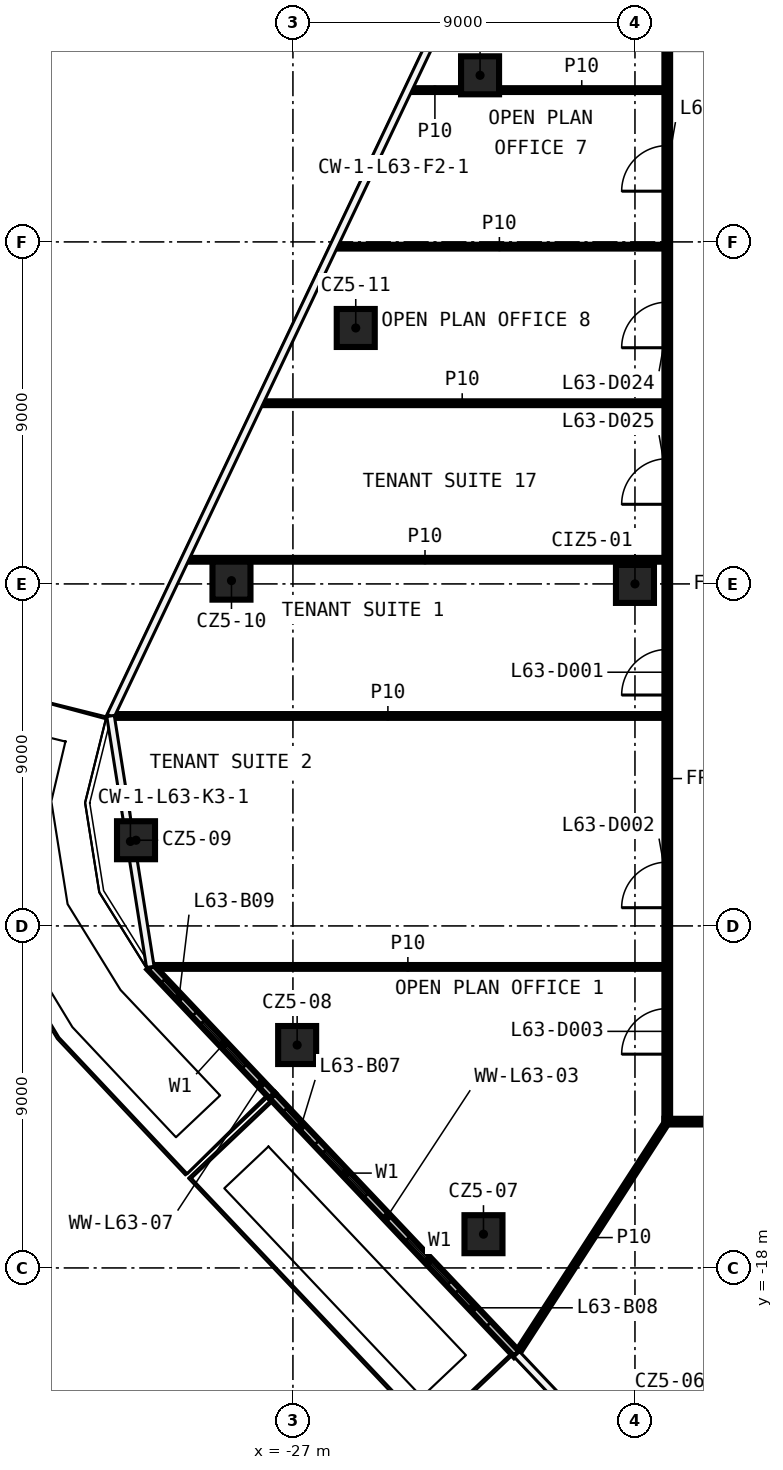
"""IFC4 building model, lengths in metres.
Left out: names, types, materials, properties, quantities, classifications, styles, units other than length and angle.
Written with IfcOpenShell. Run it as: python <this file> out.ifc"""

import sys

from ifc_helpers import new_model, si_unit, direction, frame, frame_2d, origin, origin_2d, place, context, subcontext, project, spatial, rectangle, extrude, element, fill, save


model = new_model("IFC4")
c1 = context("Model", 3, precision=1e-05, world=origin(), true_north=direction((0.0, 1.0)))
c2 = subcontext(c1, "Body", "Model", "MODEL_VIEW")
j1 = project(units=[si_unit("LENGTHUNIT", "METRE"), si_unit("PLANEANGLEUNIT", "RADIAN")], contexts=[c1])
p1 = place(None, origin())
s1 = spatial("IfcSite", under=j1, at=p1, CompositionType="ELEMENT")
p2 = place(p1, origin())
s2 = spatial("IfcBuilding", under=s1, at=p2, CompositionType="ELEMENT")
p3 = place(p2, frame((0.0, 0.0, 298.4)))
s3 = spatial("IfcBuildingStorey", under=s2, at=p3, CompositionType="ELEMENT", Elevation=298.4)
for number, where, z_axis, x_axis in (
    (1, (-21.986, -17.112, 0.0), (0.0, 0.0, 1.0), (1.0, 0.0, 0.0)),
    (2, (-26.889, -12.134, 0.0), (0.0, 0.0, 1.0), (1.0, 0.0, 0.0)),
    (3, (-31.129, -6.745, 0.0), (0.0, 0.0, 1.0), (1.0, 0.0, 0.0)),
    (4, (-28.617, 0.086, 0.0), (0.0, 0.0, 1.0), (1.0, 0.0, 0.0)),
    (5, (-25.347, 6.735, 0.0), (0.0, 0.0, 1.0), (1.0, 0.0, 0.0)),
    (6, (-22.076, 13.384, 0.0), (0.0, 0.0, 1.0), (1.0, 0.0, 0.0)),
    (7, (-18.0, 0.0, 0.0), (0.0, 0.0, 1.0), (1.0, 0.0, 0.0)),
):
    element("IfcColumn", number, at=place(p3, frame(where, z_axis=z_axis, x_axis=x_axis)), inside=s3, PredefinedType="COLUMN", context=c2, shape_type="SweptSolid", body=[
        extrude(rectangle(XDim=1.0, YDim=1.0, at=origin_2d()), origin(), (0.0, 0.0, 1.0), 3.82),
    ])
p4 = place(p3, frame((17.225, -14.15, 0.0), z_axis=(0.0, 0.0, 1.0), x_axis=(-1.0, 0.0, 0.0)))
e8 = element("IfcWall", 8, at=p4, inside=s3, PredefinedType="PARTITIONING", context=c2, shape_type="SweptSolid", body=[
    extrude(rectangle(XDim=34.45, YDim=0.15, at=frame_2d((17.225, 0.0))), origin(), (0.0, 0.0, 1.0), 3.82),
])
p5 = place(p4, frame((31.54, 0.0, 0.0)))
e9 = element("IfcOpeningElement", 9, at=p5, cuts=e8, PredefinedType="OPENING", context=c2, shape_type="SweptSolid", body=[
    extrude(rectangle(XDim=1.2, YDim=2.1, at=frame_2d((0.6, 1.05))), frame((0.0, 0.085, 0.0), z_axis=(0.0, -1.0, 0.0), x_axis=(1.0, 0.0, 0.0)), (0.0, 0.0, 1.0), 0.17),
])
p6 = place(p4, frame((25.804, 0.0, 0.0)))
e10 = element("IfcOpeningElement", 10, at=p6, cuts=e8, PredefinedType="OPENING", context=c2, shape_type="SweptSolid", body=[
    extrude(rectangle(XDim=1.2, YDim=2.1, at=frame_2d((0.6, 1.05))), frame((0.0, 0.085, 0.0), z_axis=(0.0, -1.0, 0.0), x_axis=(1.0, 0.0, 0.0)), (0.0, 0.0, 1.0), 0.17),
])
p7 = place(p4, frame((17.681, 0.0, 0.0)))
e11 = element("IfcOpeningElement", 11, at=p7, cuts=e8, PredefinedType="OPENING", context=c2, shape_type="SweptSolid", body=[
    extrude(rectangle(XDim=1.2, YDim=2.1, at=frame_2d((0.6, 1.05))), frame((0.0, 0.085, 0.0), z_axis=(0.0, -1.0, 0.0), x_axis=(1.0, 0.0, 0.0)), (0.0, 0.0, 1.0), 0.17),
])
p8 = place(p4, frame((10.752, 0.0, 0.0)))
e12 = element("IfcOpeningElement", 12, at=p8, cuts=e8, PredefinedType="OPENING", context=c2, shape_type="SweptSolid", body=[
    extrude(rectangle(XDim=1.2, YDim=2.1, at=frame_2d((0.6, 1.05))), frame((0.0, 0.085, 0.0), z_axis=(0.0, -1.0, 0.0), x_axis=(1.0, 0.0, 0.0)), (0.0, 0.0, 1.0), 0.17),
])
p9 = place(p4, frame((6.133, 0.0, 0.0)))
e13 = element("IfcOpeningElement", 13, at=p9, cuts=e8, PredefinedType="OPENING", context=c2, shape_type="SweptSolid", body=[
    extrude(rectangle(XDim=1.2, YDim=2.1, at=frame_2d((0.6, 1.05))), frame((0.0, 0.085, 0.0), z_axis=(0.0, -1.0, 0.0), x_axis=(1.0, 0.0, 0.0)), (0.0, 0.0, 1.0), 0.17),
])
p10 = place(p4, frame((1.851, 0.0, 0.0)))
e14 = element("IfcOpeningElement", 14, at=p10, cuts=e8, PredefinedType="OPENING", context=c2, shape_type="SweptSolid", body=[
    extrude(rectangle(XDim=1.2, YDim=2.1, at=frame_2d((0.6, 1.05))), frame((0.0, 0.085, 0.0), z_axis=(0.0, -1.0, 0.0), x_axis=(1.0, 0.0, 0.0)), (0.0, 0.0, 1.0), 0.17),
])
p11 = place(p3, frame((-30.726, -10.079, 0.0), z_axis=(0.0, 0.0, 1.0), x_axis=(1.0, 0.0, 0.0)))
e15 = element("IfcWall", 15, at=p11, inside=s3, PredefinedType="PARTITIONING", context=c2, shape_type="SweptSolid", body=[
    extrude(rectangle(XDim=13.5, YDim=0.1, at=frame_2d((6.75, 0.0))), origin(), (0.0, 0.0, 1.0), 3.82),
])
p12 = place(p3, frame((-31.777, -3.475, 0.0), z_axis=(0.0, 0.0, 1.0), x_axis=(1.0, 0.0, 0.0)))
e16 = element("IfcWall", 16, at=p12, inside=s3, PredefinedType="PARTITIONING", context=c2, shape_type="SweptSolid", body=[
    extrude(rectangle(XDim=14.552, YDim=0.1, at=frame_2d((7.276, 0.0))), origin(), (0.0, 0.0, 1.0), 3.82),
])
p13 = place(p3, frame((-29.824, 0.635, 0.0), z_axis=(0.0, 0.0, 1.0), x_axis=(1.0, 0.0, 0.0)))
e17 = element("IfcWall", 17, at=p13, inside=s3, PredefinedType="PARTITIONING", context=c2, shape_type="SweptSolid", body=[
    extrude(rectangle(XDim=12.599, YDim=0.1, at=frame_2d((6.3, 0.0))), origin(), (0.0, 0.0, 1.0), 3.82),
])
p14 = place(p3, frame((-27.867, 4.755, 0.0), z_axis=(0.0, 0.0, 1.0), x_axis=(1.0, 0.0, 0.0)))
e18 = element("IfcWall", 18, at=p14, inside=s3, PredefinedType="PARTITIONING", context=c2, shape_type="SweptSolid", body=[
    extrude(rectangle(XDim=10.642, YDim=0.1, at=frame_2d((5.321, 0.0))), origin(), (0.0, 0.0, 1.0), 3.82),
])
p15 = place(p3, frame((-25.909, 8.875, 0.0), z_axis=(0.0, 0.0, 1.0), x_axis=(1.0, 0.0, 0.0)))
e19 = element("IfcWall", 19, at=p15, inside=s3, PredefinedType="PARTITIONING", context=c2, shape_type="SweptSolid", body=[
    extrude(rectangle(XDim=8.684, YDim=0.1, at=frame_2d((4.342, 0.0))), origin(), (0.0, 0.0, 1.0), 3.82),
])
p16 = place(p3, frame((-23.952, 12.995, 0.0), z_axis=(0.0, 0.0, 1.0), x_axis=(1.0, 0.0, 0.0)))
e20 = element("IfcWall", 20, at=p16, inside=s3, PredefinedType="PARTITIONING", context=c2, shape_type="SweptSolid", body=[
    extrude(rectangle(XDim=1.376, YDim=0.1, at=frame_2d((0.688, 0.0))), origin(), (0.0, 0.0, 1.0), 3.82),
])
p17 = place(p3, frame((-21.576, 12.995, 0.0), z_axis=(0.0, 0.0, 1.0), x_axis=(1.0, 0.0, 0.0)))
e21 = element("IfcWall", 21, at=p17, inside=s3, PredefinedType="PARTITIONING", context=c2, shape_type="SweptSolid", body=[
    extrude(rectangle(XDim=4.351, YDim=0.1, at=frame_2d((2.175, 0.0))), origin(), (0.0, 0.0, 1.0), 3.82),
])
p18 = place(p3, frame((-21.099, -20.252, 0.0), z_axis=(0.0, 0.0, 1.0), x_axis=(0.543308378863, 0.839533206882, 0.0)))
e22 = element("IfcWall", 22, at=p18, inside=s3, PredefinedType="PARTITIONING", context=c2, shape_type="SweptSolid", body=[
    extrude(rectangle(XDim=7.268, YDim=0.1, at=frame_2d((3.634, 0.0))), origin(), (0.0, 0.0, 1.0), 3.82),
])
p19 = place(p3, frame((-17.15, -14.075, 0.0), z_axis=(0.0, 0.0, 1.0), x_axis=(0.0, 1.0, 0.0)))
e23 = element("IfcWall", 23, at=p19, inside=s3, PredefinedType="PARTITIONING", context=c2, shape_type="SweptSolid", body=[
    extrude(rectangle(XDim=28.15, YDim=0.15, at=frame_2d((14.075, 0.0))), origin(), (0.0, 0.0, 1.0), 3.82),
])
p20 = place(p19, frame((11.151, 0.0, 0.0)))
e24 = element("IfcOpeningElement", 24, at=p20, cuts=e23, PredefinedType="OPENING", context=c2, shape_type="SweptSolid", body=[
    extrude(rectangle(XDim=1.2, YDim=2.1, at=frame_2d((0.6, 1.05))), frame((0.0, 0.085, 0.0), z_axis=(0.0, -1.0, 0.0), x_axis=(1.0, 0.0, 0.0)), (0.0, 0.0, 1.0), 0.17),
])
p21 = place(p19, frame((5.555, 0.0, 0.0)))
e25 = element("IfcOpeningElement", 25, at=p21, cuts=e23, PredefinedType="OPENING", context=c2, shape_type="SweptSolid", body=[
    extrude(rectangle(XDim=1.2, YDim=2.1, at=frame_2d((0.6, 1.05))), frame((0.0, 0.085, 0.0), z_axis=(0.0, -1.0, 0.0), x_axis=(1.0, 0.0, 0.0)), (0.0, 0.0, 1.0), 0.17),
])
p22 = place(p19, frame((1.7, 0.0, 0.0)))
e26 = element("IfcOpeningElement", 26, at=p22, cuts=e23, PredefinedType="OPENING", context=c2, shape_type="SweptSolid", body=[
    extrude(rectangle(XDim=1.2, YDim=2.1, at=frame_2d((0.6, 1.05))), frame((0.0, 0.085, 0.0), z_axis=(0.0, -1.0, 0.0), x_axis=(1.0, 0.0, 0.0)), (0.0, 0.0, 1.0), 0.17),
])
p23 = place(p19, frame((24.41, 0.0, 0.0)))
e27 = element("IfcOpeningElement", 27, at=p23, cuts=e23, PredefinedType="OPENING", context=c2, shape_type="SweptSolid", body=[
    extrude(rectangle(XDim=1.2, YDim=2.1, at=frame_2d((0.6, 1.05))), frame((0.0, 0.085, 0.0), z_axis=(0.0, -1.0, 0.0), x_axis=(1.0, 0.0, 0.0)), (0.0, 0.0, 1.0), 0.17),
])
p24 = place(p19, frame((20.29, 0.0, 0.0)))
e28 = element("IfcOpeningElement", 28, at=p24, cuts=e23, PredefinedType="OPENING", context=c2, shape_type="SweptSolid", body=[
    extrude(rectangle(XDim=1.2, YDim=2.1, at=frame_2d((0.6, 1.05))), frame((0.0, 0.085, 0.0), z_axis=(0.0, -1.0, 0.0), x_axis=(1.0, 0.0, 0.0)), (0.0, 0.0, 1.0), 0.17),
])
p25 = place(p19, frame((16.17, 0.0, 0.0)))
e29 = element("IfcOpeningElement", 29, at=p25, cuts=e23, PredefinedType="OPENING", context=c2, shape_type="SweptSolid", body=[
    extrude(rectangle(XDim=1.2, YDim=2.1, at=frame_2d((0.6, 1.05))), frame((0.0, 0.085, 0.0), z_axis=(0.0, -1.0, 0.0), x_axis=(1.0, 0.0, 0.0)), (0.0, 0.0, 1.0), 0.17),
])
p26 = place(p3, frame((-27.543, -13.471, 0.0), z_axis=(0.0, 0.0, 1.0), x_axis=(0.687314061727, -0.726360365488, 0.0)))
e30 = element("IfcWall", 30, at=p26, inside=s3, PredefinedType="SOLIDWALL", context=c2, shape_type="SweptSolid", body=[
    extrude(rectangle(XDim=9.36, YDim=0.2, at=frame_2d((4.68, 0.0))), origin(), (0.0, 0.0, 1.0), 3.82),
])
p27 = place(p26, frame((2.0, 0.0, 0.6)))
e31 = element("IfcOpeningElement", 31, at=p27, cuts=e30, PredefinedType="OPENING", context=c2, shape_type="SweptSolid", body=[
    extrude(rectangle(XDim=1.6, YDim=2.4, at=frame_2d((0.8, 1.2))), frame((0.0, 0.11, 0.0), z_axis=(0.0, -1.0, 0.0), x_axis=(1.0, 0.0, 0.0)), (0.0, 0.0, 1.0), 0.22),
])
p28 = place(p26, frame((0.5, 0.0, 0.0)))
e32 = element("IfcOpeningElement", 32, at=p28, cuts=e30, PredefinedType="OPENING", context=c2, shape_type="SweptSolid", body=[
    extrude(rectangle(XDim=1.2, YDim=2.4, at=frame_2d((0.6, 1.2))), frame((0.0, 0.11, 0.0), z_axis=(0.0, -1.0, 0.0), x_axis=(1.0, 0.0, 0.0)), (0.0, 0.0, 1.0), 0.22),
])
p29 = place(p26, frame((5.18, 0.0, 0.6)))
e33 = element("IfcOpeningElement", 33, at=p29, cuts=e30, PredefinedType="OPENING", context=c2, shape_type="SweptSolid", body=[
    extrude(rectangle(XDim=1.6, YDim=2.4, at=frame_2d((0.8, 1.2))), frame((0.0, 0.11, 0.0), z_axis=(0.0, -1.0, 0.0), x_axis=(1.0, 0.0, 0.0)), (0.0, 0.0, 1.0), 0.22),
])
p30 = place(p26, frame((7.08, 0.0, 0.0)))
e34 = element("IfcOpeningElement", 34, at=p30, cuts=e30, PredefinedType="OPENING", context=c2, shape_type="SweptSolid", body=[
    extrude(rectangle(XDim=1.2, YDim=2.4, at=frame_2d((0.6, 1.2))), frame((0.0, 0.11, 0.0), z_axis=(0.0, -1.0, 0.0), x_axis=(1.0, 0.0, 0.0)), (0.0, 0.0, 1.0), 0.22),
])
p31 = place(p3, frame((-30.753, -10.079, 0.0), z_axis=(0.0, 0.0, 1.0), x_axis=(0.687310953658, -0.726363306467, 0.0)))
e35 = element("IfcWall", 35, at=p31, inside=s3, PredefinedType="SOLIDWALL", context=c2, shape_type="SweptSolid", body=[
    extrude(rectangle(XDim=4.67, YDim=0.2, at=frame_2d((2.335, 0.0))), origin(), (0.0, 0.0, 1.0), 3.82),
])
p32 = place(p31, frame((2.0, 0.0, 0.6)))
e36 = element("IfcOpeningElement", 36, at=p32, cuts=e35, PredefinedType="OPENING", context=c2, shape_type="SweptSolid", body=[
    extrude(rectangle(XDim=1.6, YDim=2.4, at=frame_2d((0.8, 1.2))), frame((0.0, 0.11, 0.0), z_axis=(0.0, -1.0, 0.0), x_axis=(1.0, 0.0, 0.0)), (0.0, 0.0, 1.0), 0.22),
])
p33 = place(p31, frame((0.5, 0.0, 0.0)))
e37 = element("IfcOpeningElement", 37, at=p33, cuts=e35, PredefinedType="OPENING", context=c2, shape_type="SweptSolid", body=[
    extrude(rectangle(XDim=1.2, YDim=2.4, at=frame_2d((0.6, 1.2))), frame((0.0, 0.11, 0.0), z_axis=(0.0, -1.0, 0.0), x_axis=(1.0, 0.0, 0.0)), (0.0, 0.0, 1.0), 0.22),
])
p34 = place(p20, origin())
e38 = element("IfcDoor", 38, at=p34, inside=s3, OperationType="SINGLE_SWING_RIGHT", PredefinedType="DOOR", context=c2, shape_type="SweptSolid", body=[
    extrude(rectangle(XDim=1.2, YDim=2.1, at=frame_2d((0.6, 1.05))), frame((0.0, 0.025, 0.0), z_axis=(0.0, -1.0, 0.0), x_axis=(1.0, 0.0, 0.0)), (0.0, 0.0, 1.0), 0.05),
])
fill(e24, e38)
p35 = place(p21, origin())
e39 = element("IfcDoor", 39, at=p35, inside=s3, OperationType="SINGLE_SWING_LEFT", PredefinedType="DOOR", context=c2, shape_type="SweptSolid", body=[
    extrude(rectangle(XDim=1.2, YDim=2.1, at=frame_2d((0.6, 1.05))), frame((0.0, 0.025, 0.0), z_axis=(0.0, -1.0, 0.0), x_axis=(1.0, 0.0, 0.0)), (0.0, 0.0, 1.0), 0.05),
])
fill(e25, e39)
p36 = place(p22, origin())
e40 = element("IfcDoor", 40, at=p36, inside=s3, OperationType="SINGLE_SWING_RIGHT", PredefinedType="DOOR", context=c2, shape_type="SweptSolid", body=[
    extrude(rectangle(XDim=1.2, YDim=2.1, at=frame_2d((0.6, 1.05))), frame((0.0, 0.025, 0.0), z_axis=(0.0, -1.0, 0.0), x_axis=(1.0, 0.0, 0.0)), (0.0, 0.0, 1.0), 0.05),
])
fill(e26, e40)
p37 = place(p23, origin())
e41 = element("IfcDoor", 41, at=p37, inside=s3, OperationType="SINGLE_SWING_RIGHT", PredefinedType="DOOR", context=c2, shape_type="SweptSolid", body=[
    extrude(rectangle(XDim=1.2, YDim=2.1, at=frame_2d((0.6, 1.05))), frame((0.0, 0.025, 0.0), z_axis=(0.0, -1.0, 0.0), x_axis=(1.0, 0.0, 0.0)), (0.0, 0.0, 1.0), 0.05),
])
fill(e27, e41)
p38 = place(p24, origin())
e42 = element("IfcDoor", 42, at=p38, inside=s3, OperationType="SINGLE_SWING_LEFT", PredefinedType="DOOR", context=c2, shape_type="SweptSolid", body=[
    extrude(rectangle(XDim=1.2, YDim=2.1, at=frame_2d((0.6, 1.05))), frame((0.0, 0.025, 0.0), z_axis=(0.0, -1.0, 0.0), x_axis=(1.0, 0.0, 0.0)), (0.0, 0.0, 1.0), 0.05),
])
fill(e28, e42)
p39 = place(p25, origin())
e43 = element("IfcDoor", 43, at=p39, inside=s3, OperationType="SINGLE_SWING_RIGHT", PredefinedType="DOOR", context=c2, shape_type="SweptSolid", body=[
    extrude(rectangle(XDim=1.2, YDim=2.1, at=frame_2d((0.6, 1.05))), frame((0.0, 0.025, 0.0), z_axis=(0.0, -1.0, 0.0), x_axis=(1.0, 0.0, 0.0)), (0.0, 0.0, 1.0), 0.05),
])
fill(e29, e43)
p40 = place(p27, origin())
e44 = element("IfcWindow", 44, at=p40, inside=s3, PartitioningType="SINGLE_PANEL", PredefinedType="WINDOW", context=c2, shape_type="SweptSolid", body=[
    extrude(rectangle(XDim=1.6, YDim=2.4, at=frame_2d((0.8, 1.2))), frame((0.0, 0.03, 0.0), z_axis=(0.0, -1.0, 0.0), x_axis=(1.0, 0.0, 0.0)), (0.0, 0.0, 1.0), 0.06),
])
fill(e31, e44)
p41 = place(p28, origin())
e45 = element("IfcDoor", 45, at=p41, inside=s3, OperationType="SLIDING_TO_LEFT", PredefinedType="DOOR", context=c2, shape_type="SweptSolid", body=[
    extrude(rectangle(XDim=1.2, YDim=2.4, at=frame_2d((0.6, 1.2))), frame((0.0, 0.025, 0.0), z_axis=(0.0, -1.0, 0.0), x_axis=(1.0, 0.0, 0.0)), (0.0, 0.0, 1.0), 0.05),
])
fill(e32, e45)
p42 = place(p29, origin())
e46 = element("IfcWindow", 46, at=p42, inside=s3, PartitioningType="SINGLE_PANEL", PredefinedType="WINDOW", context=c2, shape_type="SweptSolid", body=[
    extrude(rectangle(XDim=1.6, YDim=2.4, at=frame_2d((0.8, 1.2))), frame((0.0, 0.03, 0.0), z_axis=(0.0, -1.0, 0.0), x_axis=(1.0, 0.0, 0.0)), (0.0, 0.0, 1.0), 0.06),
])
fill(e33, e46)
p43 = place(p30, origin())
e47 = element("IfcDoor", 47, at=p43, inside=s3, OperationType="SLIDING_TO_LEFT", PredefinedType="DOOR", context=c2, shape_type="SweptSolid", body=[
    extrude(rectangle(XDim=1.2, YDim=2.4, at=frame_2d((0.6, 1.2))), frame((0.0, 0.025, 0.0), z_axis=(0.0, -1.0, 0.0), x_axis=(1.0, 0.0, 0.0)), (0.0, 0.0, 1.0), 0.05),
])
fill(e34, e47)
p44 = place(p32, origin())
e48 = element("IfcWindow", 48, at=p44, inside=s3, PartitioningType="SINGLE_PANEL", PredefinedType="WINDOW", context=c2, shape_type="SweptSolid", body=[
    extrude(rectangle(XDim=1.6, YDim=2.4, at=frame_2d((0.8, 1.2))), frame((0.0, 0.03, 0.0), z_axis=(0.0, -1.0, 0.0), x_axis=(1.0, 0.0, 0.0)), (0.0, 0.0, 1.0), 0.06),
])
fill(e36, e48)
p45 = place(p33, origin())
e49 = element("IfcDoor", 49, at=p45, inside=s3, OperationType="SLIDING_TO_LEFT", PredefinedType="DOOR", context=c2, shape_type="SweptSolid", body=[
    extrude(rectangle(XDim=1.2, YDim=2.4, at=frame_2d((0.6, 1.2))), frame((0.0, 0.025, 0.0), z_axis=(0.0, -1.0, 0.0), x_axis=(1.0, 0.0, 0.0)), (0.0, 0.0, 1.0), 0.05),
])
fill(e37, e49)
save(model, sys.argv[1])
